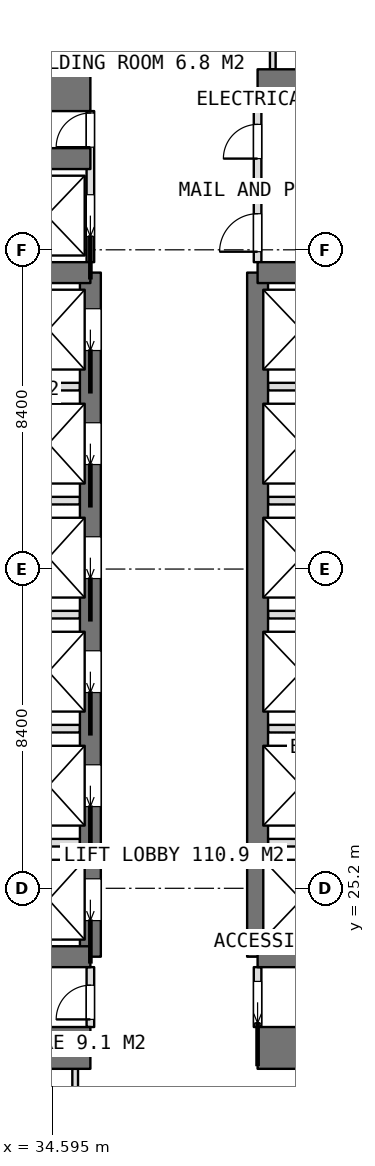
"""IFC4 building model, lengths in metres.
Left out: names, types, materials, properties, quantities, classifications, styles, units other than length and angle.
Written with IfcOpenShell. Run it as: python <this file> out.ifc"""

import sys

from ifc_helpers import new_model, si_unit, direction, frame, frame_2d, origin, place, context, subcontext, project, spatial, rectangle, extrude, element, fill, save


model = new_model("IFC4")
c1 = context("Model", 3, precision=1e-05, world=origin(), true_north=direction((0.0, 1.0)))
c2 = subcontext(c1, "Body", "Model", "MODEL_VIEW")
j1 = project(units=[si_unit("LENGTHUNIT", "METRE"), si_unit("PLANEANGLEUNIT", "RADIAN")], contexts=[c1])
p1 = place(None, origin())
s1 = spatial("IfcSite", under=j1, at=p1, CompositionType="ELEMENT")
p2 = place(p1, origin())
s2 = spatial("IfcBuilding", under=s1, at=p2, CompositionType="ELEMENT")
p3 = place(p2, frame((0.0, 0.0, 59.15)))
s3 = spatial("IfcBuildingStorey", under=s2, at=p3, CompositionType="ELEMENT", Elevation=59.15)
p4 = place(p3, frame((25.2, 21.0, 0.0), z_axis=(0.0, 0.0, 1.0), x_axis=(1.0, 0.0, 0.0)))
e1 = element("IfcWall", 1, at=p4, inside=s3, PredefinedType="SHEAR", context=c2, shape_type="SweptSolid", body=[
    extrude(rectangle(XDim=10.4, YDim=1.1, at=frame_2d((5.2, 0.0))), origin(), (0.0, 0.0, 1.0), 3.75),
])
p5 = place(p3, frame((40.0, 21.0, 0.0), z_axis=(0.0, 0.0, 1.0), x_axis=(1.0, 0.0, 0.0)))
e2 = element("IfcWall", 2, at=p5, inside=s3, PredefinedType="SHEAR", context=c2, shape_type="SweptSolid", body=[
    extrude(rectangle(XDim=10.4, YDim=1.1, at=frame_2d((5.2, 0.0))), origin(), (0.0, 0.0, 1.0), 3.75),
])
p6 = place(p3, frame((25.2, 46.2, 0.0), z_axis=(0.0, 0.0, 1.0), x_axis=(1.0, 0.0, 0.0)))
e3 = element("IfcWall", 3, at=p6, inside=s3, PredefinedType="SHEAR", context=c2, shape_type="SweptSolid", body=[
    extrude(rectangle(XDim=10.4, YDim=1.1, at=frame_2d((5.2, 0.0))), origin(), (0.0, 0.0, 1.0), 3.75),
])
p7 = place(p3, frame((40.0, 46.2, 0.0), z_axis=(0.0, 0.0, 1.0), x_axis=(1.0, 0.0, 0.0)))
e4 = element("IfcWall", 4, at=p7, inside=s3, PredefinedType="SHEAR", context=c2, shape_type="SweptSolid", body=[
    extrude(rectangle(XDim=10.4, YDim=1.1, at=frame_2d((5.2, 0.0))), origin(), (0.0, 0.0, 1.0), 3.75),
])
p8 = place(p3, frame((35.6, 23.4, 0.0), z_axis=(0.0, 0.0, 1.0), x_axis=(0.0, 1.0, 0.0)))
e5 = element("IfcWall", 5, at=p8, inside=s3, PredefinedType="SHEAR", context=c2, shape_type="SweptSolid", body=[
    extrude(rectangle(XDim=18.0, YDim=0.55, at=frame_2d((9.0, 0.0))), origin(), (0.0, 0.0, 1.0), 3.75),
])
p9 = place(p8, frame((0.95, 0.0, 0.0)))
e6 = element("IfcOpeningElement", 6, at=p9, cuts=e5, PredefinedType="OPENING", context=c2, shape_type="SweptSolid", body=[
    extrude(rectangle(XDim=1.1, YDim=2.1, at=frame_2d((0.55, 1.05))), frame((0.0, 0.285, 0.0), z_axis=(0.0, -1.0, 0.0), x_axis=(1.0, 0.0, 0.0)), (0.0, 0.0, 1.0), 0.57),
])
p10 = place(p8, frame((3.95, 0.0, 0.0)))
e7 = element("IfcOpeningElement", 7, at=p10, cuts=e5, PredefinedType="OPENING", context=c2, shape_type="SweptSolid", body=[
    extrude(rectangle(XDim=1.1, YDim=2.1, at=frame_2d((0.55, 1.05))), frame((0.0, 0.285, 0.0), z_axis=(0.0, -1.0, 0.0), x_axis=(1.0, 0.0, 0.0)), (0.0, 0.0, 1.0), 0.57),
])
p11 = place(p8, frame((6.95, 0.0, 0.0)))
e8 = element("IfcOpeningElement", 8, at=p11, cuts=e5, PredefinedType="OPENING", context=c2, shape_type="SweptSolid", body=[
    extrude(rectangle(XDim=1.1, YDim=2.1, at=frame_2d((0.55, 1.05))), frame((0.0, 0.285, 0.0), z_axis=(0.0, -1.0, 0.0), x_axis=(1.0, 0.0, 0.0)), (0.0, 0.0, 1.0), 0.57),
])
p12 = place(p8, frame((9.95, 0.0, 0.0)))
e9 = element("IfcOpeningElement", 9, at=p12, cuts=e5, PredefinedType="OPENING", context=c2, shape_type="SweptSolid", body=[
    extrude(rectangle(XDim=1.1, YDim=2.1, at=frame_2d((0.55, 1.05))), frame((0.0, 0.285, 0.0), z_axis=(0.0, -1.0, 0.0), x_axis=(1.0, 0.0, 0.0)), (0.0, 0.0, 1.0), 0.57),
])
p13 = place(p8, frame((12.95, 0.0, 0.0)))
e10 = element("IfcOpeningElement", 10, at=p13, cuts=e5, PredefinedType="OPENING", context=c2, shape_type="SweptSolid", body=[
    extrude(rectangle(XDim=1.1, YDim=2.1, at=frame_2d((0.55, 1.05))), frame((0.0, 0.285, 0.0), z_axis=(0.0, -1.0, 0.0), x_axis=(1.0, 0.0, 0.0)), (0.0, 0.0, 1.0), 0.57),
])
p14 = place(p8, frame((15.95, 0.0, 0.0)))
e11 = element("IfcOpeningElement", 11, at=p14, cuts=e5, PredefinedType="OPENING", context=c2, shape_type="SweptSolid", body=[
    extrude(rectangle(XDim=1.1, YDim=2.1, at=frame_2d((0.55, 1.05))), frame((0.0, 0.285, 0.0), z_axis=(0.0, -1.0, 0.0), x_axis=(1.0, 0.0, 0.0)), (0.0, 0.0, 1.0), 0.57),
])
p15 = place(p3, frame((40.0, 23.4, 0.0), z_axis=(0.0, 0.0, 1.0), x_axis=(0.0, 1.0, 0.0)))
e12 = element("IfcWall", 12, at=p15, inside=s3, PredefinedType="SHEAR", context=c2, shape_type="SweptSolid", body=[
    extrude(rectangle(XDim=18.0, YDim=0.55, at=frame_2d((9.0, 0.0))), origin(), (0.0, 0.0, 1.0), 3.75),
])
for number, where, z_axis, x_axis in (
    (13, (31.8, 23.4, 0.0), (0.0, 0.0, 1.0), (1.0, 0.0, 0.0)),
    (14, (31.8, 41.4, 0.0), (0.0, 0.0, 1.0), (1.0, 0.0, 0.0)),
    (15, (31.8, 44.4, 0.0), (0.0, 0.0, 1.0), (1.0, 0.0, 0.0)),
    (16, (40.0, 23.4, 0.0), (0.0, 0.0, 1.0), (1.0, 0.0, 0.0)),
    (17, (40.0, 41.4, 0.0), (0.0, 0.0, 1.0), (1.0, 0.0, 0.0)),
):
    element("IfcWall", number, at=place(p3, frame(where, z_axis=z_axis, x_axis=x_axis)), inside=s3, PredefinedType="SHEAR", context=c2, shape_type="SweptSolid", body=[
        extrude(rectangle(XDim=3.8, YDim=0.55, at=frame_2d((1.9, 0.0))), origin(), (0.0, 0.0, 1.0), 3.75),
    ])
for number, where, z_axis, x_axis in (
    (18, (32.075, 26.4, 0.0), (0.0, 0.0, 1.0), (1.0, 0.0, 0.0)),
    (19, (32.075, 29.4, 0.0), (0.0, 0.0, 1.0), (1.0, 0.0, 0.0)),
    (20, (32.075, 32.4, 0.0), (0.0, 0.0, 1.0), (1.0, 0.0, 0.0)),
    (21, (32.075, 35.4, 0.0), (0.0, 0.0, 1.0), (1.0, 0.0, 0.0)),
    (22, (32.075, 38.4, 0.0), (0.0, 0.0, 1.0), (1.0, 0.0, 0.0)),
    (23, (40.275, 26.4, 0.0), (0.0, 0.0, 1.0), (1.0, 0.0, 0.0)),
    (24, (40.275, 29.4, 0.0), (0.0, 0.0, 1.0), (1.0, 0.0, 0.0)),
    (25, (40.275, 32.4, 0.0), (0.0, 0.0, 1.0), (1.0, 0.0, 0.0)),
    (26, (40.275, 35.4, 0.0), (0.0, 0.0, 1.0), (1.0, 0.0, 0.0)),
    (27, (40.275, 38.4, 0.0), (0.0, 0.0, 1.0), (1.0, 0.0, 0.0)),
):
    element("IfcWall", number, at=place(p3, frame(where, z_axis=z_axis, x_axis=x_axis)), inside=s3, PredefinedType="PARTITIONING", context=c2, shape_type="SweptSolid", body=[
        extrude(rectangle(XDim=3.25, YDim=0.2, at=frame_2d((1.625, 0.0))), origin(), (0.0, 0.0, 1.0), 3.5),
    ])
p16 = place(p3, frame((40.0, 21.55, 0.0), z_axis=(0.0, 0.0, 1.0), x_axis=(0.0, 1.0, 0.0)))
e28 = element("IfcWall", 28, at=p16, inside=s3, PredefinedType="PARTITIONING", context=c2, shape_type="SweptSolid", body=[
    extrude(rectangle(XDim=1.575, YDim=0.2, at=frame_2d((0.788, 0.0))), origin(), (0.0, 0.0, 1.0), 3.5),
])
p17 = place(p16, frame((0.1, 0.0, 0.0)))
e29 = element("IfcOpeningElement", 29, at=p17, cuts=e28, PredefinedType="OPENING", context=c2, shape_type="SweptSolid", body=[
    extrude(rectangle(XDim=1.1, YDim=2.1, at=frame_2d((0.55, 1.05))), frame((0.0, 0.11, 0.0), z_axis=(0.0, -1.0, 0.0), x_axis=(1.0, 0.0, 0.0)), (0.0, 0.0, 1.0), 0.22),
])
p18 = place(p3, frame((40.0, 41.675, 0.0), z_axis=(0.0, 0.0, 1.0), x_axis=(0.0, 1.0, 0.0)))
e30 = element("IfcWall", 30, at=p18, inside=s3, PredefinedType="PARTITIONING", context=c2, shape_type="SweptSolid", body=[
    extrude(rectangle(XDim=3.975, YDim=0.2, at=frame_2d((1.987, 0.0))), origin(), (0.0, 0.0, 1.0), 3.5),
])
p19 = place(p18, frame((2.725, 0.0, 0.0)))
e31 = element("IfcOpeningElement", 31, at=p19, cuts=e30, PredefinedType="OPENING", context=c2, shape_type="SweptSolid", body=[
    extrude(rectangle(XDim=0.9, YDim=2.1, at=frame_2d((0.45, 1.05))), frame((0.0, 0.11, 0.0), z_axis=(0.0, -1.0, 0.0), x_axis=(1.0, 0.0, 0.0)), (0.0, 0.0, 1.0), 0.22),
])
p20 = place(p18, frame((0.275, 0.0, 0.0)))
e32 = element("IfcOpeningElement", 32, at=p20, cuts=e30, PredefinedType="OPENING", context=c2, shape_type="SweptSolid", body=[
    extrude(rectangle(XDim=1.0, YDim=2.1, at=frame_2d((0.5, 1.05))), frame((0.0, 0.11, 0.0), z_axis=(0.0, -1.0, 0.0), x_axis=(1.0, 0.0, 0.0)), (0.0, 0.0, 1.0), 0.22),
])
p21 = place(p3, frame((35.6, 41.675, 0.0), z_axis=(0.0, 0.0, 1.0), x_axis=(0.0, 1.0, 0.0)))
e33 = element("IfcWall", 33, at=p21, inside=s3, PredefinedType="PARTITIONING", context=c2, shape_type="SweptSolid", body=[
    extrude(rectangle(XDim=3.975, YDim=0.2, at=frame_2d((1.987, 0.0))), origin(), (0.0, 0.0, 1.0), 3.5),
])
p22 = place(p21, frame((3.025, 0.0, 0.0)))
e34 = element("IfcOpeningElement", 34, at=p22, cuts=e33, PredefinedType="OPENING", context=c2, shape_type="SweptSolid", body=[
    extrude(rectangle(XDim=0.9, YDim=2.1, at=frame_2d((0.45, 1.05))), frame((0.0, 0.11, 0.0), z_axis=(0.0, -1.0, 0.0), x_axis=(1.0, 0.0, 0.0)), (0.0, 0.0, 1.0), 0.22),
])
p23 = place(p21, frame((0.675, 0.0, 0.0)))
e35 = element("IfcOpeningElement", 35, at=p23, cuts=e33, PredefinedType="OPENING", context=c2, shape_type="SweptSolid", body=[
    extrude(rectangle(XDim=1.1, YDim=2.1, at=frame_2d((0.55, 1.05))), frame((0.0, 0.11, 0.0), z_axis=(0.0, -1.0, 0.0), x_axis=(1.0, 0.0, 0.0)), (0.0, 0.0, 1.0), 0.22),
])
p24 = place(p3, frame((35.6, 21.55, 0.0), z_axis=(0.0, 0.0, 1.0), x_axis=(0.0, 1.0, 0.0)))
e36 = element("IfcWall", 36, at=p24, inside=s3, PredefinedType="PARTITIONING", context=c2, shape_type="SweptSolid", body=[
    extrude(rectangle(XDim=1.575, YDim=0.2, at=frame_2d((0.788, 0.0))), origin(), (0.0, 0.0, 1.0), 3.5),
])
p25 = place(p24, frame((0.2, 0.0, 0.0)))
e37 = element("IfcOpeningElement", 37, at=p25, cuts=e36, PredefinedType="OPENING", context=c2, shape_type="SweptSolid", body=[
    extrude(rectangle(XDim=0.9, YDim=2.1, at=frame_2d((0.45, 1.05))), frame((0.0, 0.11, 0.0), z_axis=(0.0, -1.0, 0.0), x_axis=(1.0, 0.0, 0.0)), (0.0, 0.0, 1.0), 0.22),
])
p26 = place(p3, frame((40.0, 43.5, 0.0), z_axis=(0.0, 0.0, 1.0), x_axis=(1.0, 0.0, 0.0)))
e38 = element("IfcWall", 38, at=p26, inside=s3, PredefinedType="PARTITIONING", context=c2, shape_type="SweptSolid", body=[
    extrude(rectangle(XDim=3.525, YDim=0.2, at=frame_2d((1.762, 0.0))), origin(), (0.0, 0.0, 1.0), 3.5),
])
for number, where, z_axis, x_axis in (
    (39, (40.4, 46.75, 0.0), (0.0, 0.0, 1.0), (0.0, 1.0, 0.0)),
    (40, (35.2, 46.75, 0.0), (0.0, 0.0, 1.0), (0.0, 1.0, 0.0)),
    (41, (35.2, 17.875, 0.0), (0.0, 0.0, 1.0), (0.0, 1.0, 0.0)),
):
    element("IfcWall", number, at=place(p3, frame(where, z_axis=z_axis, x_axis=x_axis)), inside=s3, PredefinedType="PARTITIONING", context=c2, shape_type="SweptSolid", body=[
        extrude(rectangle(XDim=2.575, YDim=0.15, at=frame_2d((1.288, 0.0))), origin(), (0.0, 0.0, 1.0), 3.5),
    ])
p27 = place(p17, origin())
e42 = element("IfcDoor", 42, at=p27, inside=s3, OperationType="SLIDING_TO_LEFT", PredefinedType="DOOR", context=c2, shape_type="SweptSolid", body=[
    extrude(rectangle(XDim=1.1, YDim=2.1, at=frame_2d((0.55, 1.05))), frame((0.0, 0.025, 0.0), z_axis=(0.0, -1.0, 0.0), x_axis=(1.0, 0.0, 0.0)), (0.0, 0.0, 1.0), 0.05),
])
fill(e29, e42)
p28 = place(p25, origin())
e43 = element("IfcDoor", 43, at=p28, inside=s3, OperationType="SINGLE_SWING_LEFT", PredefinedType="DOOR", context=c2, shape_type="SweptSolid", body=[
    extrude(rectangle(XDim=0.9, YDim=2.1, at=frame_2d((0.45, 1.05))), frame((0.0, 0.025, 0.0), z_axis=(0.0, -1.0, 0.0), x_axis=(1.0, 0.0, 0.0)), (0.0, 0.0, 1.0), 0.05),
])
fill(e37, e43)
p29 = place(p19, origin())
e44 = element("IfcDoor", 44, at=p29, inside=s3, OperationType="SINGLE_SWING_LEFT", PredefinedType="DOOR", context=c2, shape_type="SweptSolid", body=[
    extrude(rectangle(XDim=0.9, YDim=2.1, at=frame_2d((0.45, 1.05))), frame((0.0, 0.025, 0.0), z_axis=(0.0, -1.0, 0.0), x_axis=(1.0, 0.0, 0.0)), (0.0, 0.0, 1.0), 0.05),
])
fill(e31, e44)
p30 = place(p20, origin())
e45 = element("IfcDoor", 45, at=p30, inside=s3, OperationType="SINGLE_SWING_LEFT", PredefinedType="DOOR", context=c2, shape_type="SweptSolid", body=[
    extrude(rectangle(XDim=1.0, YDim=2.1, at=frame_2d((0.5, 1.05))), frame((0.0, 0.025, 0.0), z_axis=(0.0, -1.0, 0.0), x_axis=(1.0, 0.0, 0.0)), (0.0, 0.0, 1.0), 0.05),
])
fill(e32, e45)
p31 = place(p22, origin())
e46 = element("IfcDoor", 46, at=p31, inside=s3, OperationType="SINGLE_SWING_LEFT", PredefinedType="DOOR", context=c2, shape_type="SweptSolid", body=[
    extrude(rectangle(XDim=0.9, YDim=2.1, at=frame_2d((0.45, 1.05))), frame((0.0, 0.025, 0.0), z_axis=(0.0, -1.0, 0.0), x_axis=(1.0, 0.0, 0.0)), (0.0, 0.0, 1.0), 0.05),
])
fill(e34, e46)
p32 = place(p9, origin())
e47 = element("IfcDoor", 47, at=p32, inside=s3, OperationType="SLIDING_TO_LEFT", PredefinedType="USERDEFINED", context=c2, shape_type="SweptSolid", body=[
    extrude(rectangle(XDim=1.1, YDim=2.1, at=frame_2d((0.55, 1.05))), frame((0.0, 0.025, 0.0), z_axis=(0.0, -1.0, 0.0), x_axis=(1.0, 0.0, 0.0)), (0.0, 0.0, 1.0), 0.05),
])
fill(e6, e47)
p33 = place(p10, origin())
e48 = element("IfcDoor", 48, at=p33, inside=s3, OperationType="SLIDING_TO_LEFT", PredefinedType="USERDEFINED", context=c2, shape_type="SweptSolid", body=[
    extrude(rectangle(XDim=1.1, YDim=2.1, at=frame_2d((0.55, 1.05))), frame((0.0, 0.025, 0.0), z_axis=(0.0, -1.0, 0.0), x_axis=(1.0, 0.0, 0.0)), (0.0, 0.0, 1.0), 0.05),
])
fill(e7, e48)
p34 = place(p11, origin())
e49 = element("IfcDoor", 49, at=p34, inside=s3, OperationType="SLIDING_TO_LEFT", PredefinedType="USERDEFINED", context=c2, shape_type="SweptSolid", body=[
    extrude(rectangle(XDim=1.1, YDim=2.1, at=frame_2d((0.55, 1.05))), frame((0.0, 0.025, 0.0), z_axis=(0.0, -1.0, 0.0), x_axis=(1.0, 0.0, 0.0)), (0.0, 0.0, 1.0), 0.05),
])
fill(e8, e49)
p35 = place(p12, origin())
e50 = element("IfcDoor", 50, at=p35, inside=s3, OperationType="SLIDING_TO_LEFT", PredefinedType="USERDEFINED", context=c2, shape_type="SweptSolid", body=[
    extrude(rectangle(XDim=1.1, YDim=2.1, at=frame_2d((0.55, 1.05))), frame((0.0, 0.025, 0.0), z_axis=(0.0, -1.0, 0.0), x_axis=(1.0, 0.0, 0.0)), (0.0, 0.0, 1.0), 0.05),
])
fill(e9, e50)
p36 = place(p13, origin())
e51 = element("IfcDoor", 51, at=p36, inside=s3, OperationType="SLIDING_TO_LEFT", PredefinedType="USERDEFINED", context=c2, shape_type="SweptSolid", body=[
    extrude(rectangle(XDim=1.1, YDim=2.1, at=frame_2d((0.55, 1.05))), frame((0.0, 0.025, 0.0), z_axis=(0.0, -1.0, 0.0), x_axis=(1.0, 0.0, 0.0)), (0.0, 0.0, 1.0), 0.05),
])
fill(e10, e51)
p37 = place(p14, origin())
e52 = element("IfcDoor", 52, at=p37, inside=s3, OperationType="SLIDING_TO_LEFT", PredefinedType="USERDEFINED", context=c2, shape_type="SweptSolid", body=[
    extrude(rectangle(XDim=1.1, YDim=2.1, at=frame_2d((0.55, 1.05))), frame((0.0, 0.025, 0.0), z_axis=(0.0, -1.0, 0.0), x_axis=(1.0, 0.0, 0.0)), (0.0, 0.0, 1.0), 0.05),
])
fill(e11, e52)
p38 = place(p23, origin())
e53 = element("IfcDoor", 53, at=p38, inside=s3, OperationType="SLIDING_TO_LEFT", PredefinedType="USERDEFINED", context=c2, shape_type="SweptSolid", body=[
    extrude(rectangle(XDim=1.1, YDim=2.1, at=frame_2d((0.55, 1.05))), frame((0.0, 0.025, 0.0), z_axis=(0.0, -1.0, 0.0), x_axis=(1.0, 0.0, 0.0)), (0.0, 0.0, 1.0), 0.05),
])
fill(e35, e53)
save(model, sys.argv[1])
